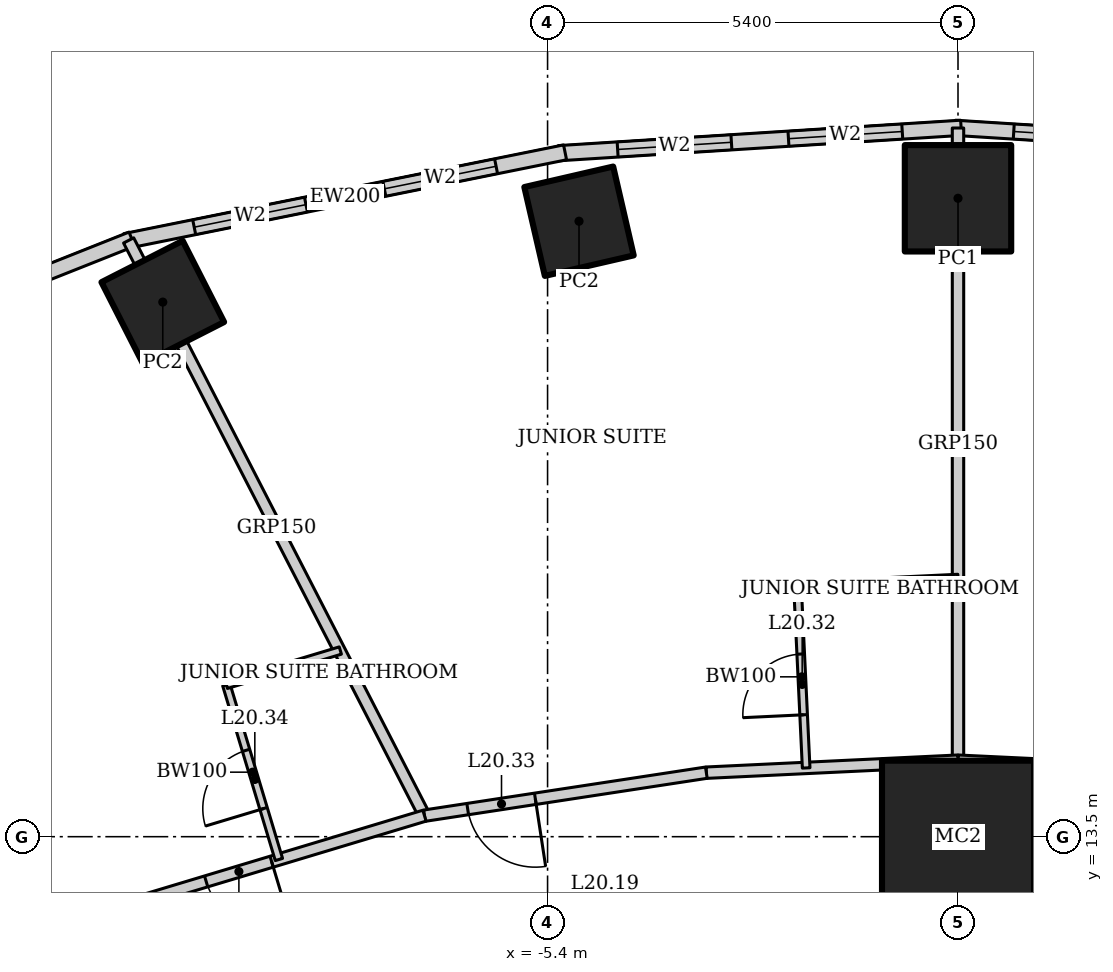
"""IFC4 building model, lengths in metres.
Left out: names, types, materials, properties, quantities, classifications, styles, units other than length and angle.
Written with IfcOpenShell. Run it as: python <this file> out.ifc"""

import sys

from ifc_helpers import new_model, si_unit, direction, frame, frame_2d, origin, origin_2d, place, context, subcontext, project, spatial, rectangle, hollow_rectangle, extrude, element, fill, save


model = new_model("IFC4")
c1 = context("Model", 3, precision=1e-05, world=origin(), true_north=direction((0.0, 1.0)))
c2 = subcontext(c1, "Body", "Model", "MODEL_VIEW")
j1 = project(units=[si_unit("LENGTHUNIT", "METRE"), si_unit("PLANEANGLEUNIT", "RADIAN")], contexts=[c1])
p1 = place(None, origin())
s1 = spatial("IfcSite", under=j1, at=p1, CompositionType="ELEMENT")
p2 = place(p1, origin())
s2 = spatial("IfcBuilding", under=s1, at=p2, CompositionType="ELEMENT")
p3 = place(p2, frame((0.0, 0.0, 87.4)))
s3 = spatial("IfcBuildingStorey", under=s2, at=p3, CompositionType="ELEMENT", Elevation=87.4)
p4 = place(p3, frame((0.0, 13.5, 0.0), z_axis=(0.0, 0.0, 1.0), x_axis=(1.0, 0.0, 0.0)))
e1 = element("IfcColumn", 1, at=p4, inside=s3, PredefinedType="COLUMN", context=c2, shape_type="SweptSolid", body=[
    extrude(hollow_rectangle(XDim=2.0, YDim=2.0, WallThickness=0.17, at=origin_2d()), origin(), (0.0, 0.0, 1.0), 3.6),
])
p5 = place(p3, frame((0.0, 21.9, 0.0), z_axis=(0.0, 0.0, 1.0), x_axis=(1.0, 0.0, 0.0)))
e2 = element("IfcColumn", 2, at=p5, inside=s3, PredefinedType="COLUMN", context=c2, shape_type="SweptSolid", body=[
    extrude(hollow_rectangle(XDim=1.4, YDim=1.4, WallThickness=0.1, at=origin_2d()), origin(), (0.0, 0.0, 1.0), 3.6),
])
for number, where, z_axis, x_axis in (
    (3, (-4.986, 21.598, 0.0), (0.0, 0.0, 1.0), (0.974, 0.225, 0.0)),
    (4, (-10.463, 20.534, 0.0), (0.0, 0.0, 1.0), (0.891, 0.454, 0.0)),
):
    element("IfcColumn", number, at=place(p3, frame(where, z_axis=z_axis, x_axis=x_axis)), inside=s3, PredefinedType="COLUMN", context=c2, shape_type="SweptSolid", body=[
        extrude(hollow_rectangle(XDim=1.2, YDim=1.2, WallThickness=0.1, at=origin_2d()), origin(), (0.0, 0.0, 1.0), 3.6),
    ])
p6 = place(p3, frame((5.253, 22.493, 0.0), z_axis=(0.0, 0.0, 1.0), x_axis=(-0.998018582375, 0.062919863585, 0.0)))
e5 = element("IfcWall", 5, at=p6, inside=s3, PredefinedType="SOLIDWALL", context=c2, shape_type="SweptSolid", body=[
    extrude(rectangle(XDim=5.304, YDim=0.2, at=frame_2d((2.652, 0.0))), origin(), (0.0, 0.0, 1.0), 3.45),
])
p7 = place(p6, frame((0.776, 0.0, 0.5)))
e6 = element("IfcOpeningElement", 6, at=p7, cuts=e5, PredefinedType="OPENING", context=c2, shape_type="SweptSolid", body=[
    extrude(rectangle(XDim=1.5, YDim=2.2, at=frame_2d((0.75, 1.1))), frame((0.0, 0.11, 0.0), z_axis=(0.0, -1.0, 0.0), x_axis=(1.0, 0.0, 0.0)), (0.0, 0.0, 1.0), 0.22),
])
p8 = place(p6, frame((3.028, 0.0, 0.5)))
e7 = element("IfcOpeningElement", 7, at=p8, cuts=e5, PredefinedType="OPENING", context=c2, shape_type="SweptSolid", body=[
    extrude(rectangle(XDim=1.5, YDim=2.2, at=frame_2d((0.75, 1.1))), frame((0.0, 0.11, 0.0), z_axis=(0.0, -1.0, 0.0), x_axis=(1.0, 0.0, 0.0)), (0.0, 0.0, 1.0), 0.22),
])
p9 = place(p3, frame((0.041, 22.827, 0.0), z_axis=(0.0, 0.0, 1.0), x_axis=(-0.998018582375, -0.062919863585, 0.0)))
e8 = element("IfcWall", 8, at=p9, inside=s3, PredefinedType="SOLIDWALL", context=c2, shape_type="SweptSolid", body=[
    extrude(rectangle(XDim=5.304, YDim=0.2, at=frame_2d((2.652, 0.0))), origin(), (0.0, 0.0, 1.0), 3.45),
])
p10 = place(p9, frame((0.776, 0.0, 0.5)))
e9 = element("IfcOpeningElement", 9, at=p10, cuts=e8, PredefinedType="OPENING", context=c2, shape_type="SweptSolid", body=[
    extrude(rectangle(XDim=1.5, YDim=2.2, at=frame_2d((0.75, 1.1))), frame((0.0, 0.11, 0.0), z_axis=(0.0, -1.0, 0.0), x_axis=(1.0, 0.0, 0.0)), (0.0, 0.0, 1.0), 0.22),
])
p11 = place(p9, frame((3.028, 0.0, 0.5)))
e10 = element("IfcOpeningElement", 10, at=p11, cuts=e8, PredefinedType="OPENING", context=c2, shape_type="SweptSolid", body=[
    extrude(rectangle(XDim=1.5, YDim=2.2, at=frame_2d((0.75, 1.1))), frame((0.0, 0.11, 0.0), z_axis=(0.0, -1.0, 0.0), x_axis=(1.0, 0.0, 0.0)), (0.0, 0.0, 1.0), 0.22),
])
p12 = place(p3, frame((-5.17, 22.504, 0.0), z_axis=(0.0, 0.0, 1.0), x_axis=(-0.980251657452, -0.197754110105, 0.0)))
e11 = element("IfcWall", 11, at=p12, inside=s3, PredefinedType="SOLIDWALL", context=c2, shape_type="SweptSolid", body=[
    extrude(rectangle(XDim=5.904, YDim=0.2, at=frame_2d((2.952, 0.0))), origin(), (0.0, 0.0, 1.0), 3.45),
])
p13 = place(p12, frame((0.926, 0.0, 0.5)))
e12 = element("IfcOpeningElement", 12, at=p13, cuts=e11, PredefinedType="OPENING", context=c2, shape_type="SweptSolid", body=[
    extrude(rectangle(XDim=1.5, YDim=2.2, at=frame_2d((0.75, 1.1))), frame((0.0, 0.11, 0.0), z_axis=(0.0, -1.0, 0.0), x_axis=(1.0, 0.0, 0.0)), (0.0, 0.0, 1.0), 0.22),
])
p14 = place(p12, frame((3.478, 0.0, 0.5)))
e13 = element("IfcOpeningElement", 13, at=p14, cuts=e11, PredefinedType="OPENING", context=c2, shape_type="SweptSolid", body=[
    extrude(rectangle(XDim=1.5, YDim=2.2, at=frame_2d((0.75, 1.1))), frame((0.0, 0.11, 0.0), z_axis=(0.0, -1.0, 0.0), x_axis=(1.0, 0.0, 0.0)), (0.0, 0.0, 1.0), 0.22),
])
p15 = place(p3, frame((-10.869, 21.363, 0.0), z_axis=(0.0, 0.0, 1.0), x_axis=(-0.929358351251, -0.369178892895, 0.0)))
e14 = element("IfcWall", 14, at=p15, inside=s3, PredefinedType="SOLIDWALL", context=c2, shape_type="SweptSolid", body=[
    extrude(rectangle(XDim=7.692, YDim=0.2, at=frame_2d((3.846, 0.0))), origin(), (0.0, 0.0, 1.0), 3.45),
])
p16 = place(p15, frame((1.373, 0.0, 0.5)))
e15 = element("IfcOpeningElement", 15, at=p16, cuts=e14, PredefinedType="OPENING", context=c2, shape_type="SweptSolid", body=[
    extrude(rectangle(XDim=1.5, YDim=2.2, at=frame_2d((0.75, 1.1))), frame((0.0, 0.11, 0.0), z_axis=(0.0, -1.0, 0.0), x_axis=(1.0, 0.0, 0.0)), (0.0, 0.0, 1.0), 0.22),
])
p17 = place(p15, frame((4.819, 0.0, 0.5)))
e16 = element("IfcOpeningElement", 16, at=p17, cuts=e14, PredefinedType="OPENING", context=c2, shape_type="SweptSolid", body=[
    extrude(rectangle(XDim=1.5, YDim=2.2, at=frame_2d((0.75, 1.1))), frame((0.0, 0.11, 0.0), z_axis=(0.0, -1.0, 0.0), x_axis=(1.0, 0.0, 0.0)), (0.0, 0.0, 1.0), 0.22),
])
p18 = place(p3, frame((0.0, 22.825, 0.0), z_axis=(0.0, 0.0, 1.0), x_axis=(0.0, -1.0, 0.0)))
e17 = element("IfcWall", 17, at=p18, inside=s3, PredefinedType="PARTITIONING", context=c2, shape_type="SweptSolid", body=[
    extrude(rectangle(XDim=8.325, YDim=0.15, at=frame_2d((4.162, 0.0))), origin(), (0.0, 0.0, 1.0), 2.924),
])
p19 = place(p3, frame((-10.912, 21.346, 0.0), z_axis=(0.0, 0.0, 1.0), x_axis=(0.457327273085, -0.889298468059, 0.0)))
e18 = element("IfcWall", 18, at=p19, inside=s3, PredefinedType="PARTITIONING", context=c2, shape_type="SweptSolid", body=[
    extrude(rectangle(XDim=8.511, YDim=0.15, at=frame_2d((4.256, 0.0))), origin(), (0.0, 0.0, 1.0), 2.528),
])
p20 = place(p3, frame((3.311, 14.342, 0.0), z_axis=(0.0, 0.0, 1.0), x_axis=(-0.998863968075, 0.047652631422, 0.0)))
e19 = element("IfcWall", 19, at=p20, inside=s3, PredefinedType="PARTITIONING", context=c2, shape_type="SweptSolid", body=[
    extrude(rectangle(XDim=3.315, YDim=0.15, at=frame_2d((1.657, 0.0))), origin(), (0.0, 0.0, 1.0), 3.45),
])
p21 = place(p20, frame((0.15, 0.0, 0.0)))
e20 = element("IfcOpeningElement", 20, at=p21, cuts=e19, PredefinedType="OPENING", context=c2, shape_type="SweptSolid", body=[
    extrude(rectangle(XDim=0.9, YDim=2.1, at=frame_2d((0.45, 1.05))), frame((0.0, 0.085, 0.0), z_axis=(0.0, -1.0, 0.0), x_axis=(1.0, 0.0, 0.0)), (0.0, 0.0, 1.0), 0.17),
])
p22 = place(p3, frame((0.0, 14.5, 0.0), z_axis=(0.0, 0.0, 1.0), x_axis=(-0.998863968075, -0.047652631422, 0.0)))
e21 = element("IfcWall", 21, at=p22, inside=s3, PredefinedType="PARTITIONING", context=c2, shape_type="SweptSolid", body=[
    extrude(rectangle(XDim=3.315, YDim=0.15, at=frame_2d((1.657, 0.0))), origin(), (0.0, 0.0, 1.0), 3.45),
])
p23 = place(p3, frame((-3.311, 14.342, 0.0), z_axis=(0.0, 0.0, 1.0), x_axis=(-0.988564270062, -0.150800145746, 0.0)))
e22 = element("IfcWall", 22, at=p23, inside=s3, PredefinedType="PARTITIONING", context=c2, shape_type="SweptSolid", body=[
    extrude(rectangle(XDim=3.751, YDim=0.15, at=frame_2d((1.875, 0.0))), origin(), (0.0, 0.0, 1.0), 3.45),
])
p24 = place(p23, frame((2.276, 0.0, 0.0)))
e23 = element("IfcOpeningElement", 23, at=p24, cuts=e22, PredefinedType="OPENING", context=c2, shape_type="SweptSolid", body=[
    extrude(rectangle(XDim=0.9, YDim=2.1, at=frame_2d((0.45, 1.05))), frame((0.0, 0.085, 0.0), z_axis=(0.0, -1.0, 0.0), x_axis=(1.0, 0.0, 0.0)), (0.0, 0.0, 1.0), 0.17),
])
p25 = place(p3, frame((-7.019, 13.776, 0.0), z_axis=(0.0, 0.0, 1.0), x_axis=(-0.957564241242, -0.288219922793, 0.0)))
e24 = element("IfcWall", 24, at=p25, inside=s3, PredefinedType="PARTITIONING", context=c2, shape_type="SweptSolid", body=[
    extrude(rectangle(XDim=5.085, YDim=0.15, at=frame_2d((2.542, 0.0))), origin(), (0.0, 0.0, 1.0), 3.45),
])
p26 = place(p25, frame((2.1, 0.0, 0.0)))
e25 = element("IfcOpeningElement", 25, at=p26, cuts=e24, PredefinedType="OPENING", context=c2, shape_type="SweptSolid", body=[
    extrude(rectangle(XDim=0.9, YDim=2.1, at=frame_2d((0.45, 1.05))), frame((0.0, 0.085, 0.0), z_axis=(0.0, -1.0, 0.0), x_axis=(1.0, 0.0, 0.0)), (0.0, 0.0, 1.0), 0.17),
])
p27 = place(p3, frame((-1.998, 14.405, 0.0), z_axis=(0.0, 0.0, 1.0), x_axis=(-0.047608648396, 0.998866065395, 0.0)))
e26 = element("IfcWall", 26, at=p27, inside=s3, PredefinedType="PARTITIONING", context=c2, shape_type="SweptSolid", body=[
    extrude(rectangle(XDim=2.4, YDim=0.1, at=frame_2d((1.2, 0.0))), origin(), (0.0, 0.0, 1.0), 2.749),
])
p28 = place(p27, frame((0.7, 0.0, 0.0)))
e27 = element("IfcOpeningElement", 27, at=p28, cuts=e26, PredefinedType="OPENING", context=c2, shape_type="SweptSolid", body=[
    extrude(rectangle(XDim=0.8, YDim=2.1, at=frame_2d((0.4, 1.05))), frame((0.0, 0.06, 0.0), z_axis=(0.0, -1.0, 0.0), x_axis=(1.0, 0.0, 0.0)), (0.0, 0.0, 1.0), 0.12),
])
p29 = place(p3, frame((-2.112, 16.802, 0.0), z_axis=(0.0, 0.0, 1.0), x_axis=(0.998862383453, 0.047685835668, 0.0)))
e28 = element("IfcWall", 28, at=p29, inside=s3, PredefinedType="PARTITIONING", context=c2, shape_type="SweptSolid", body=[
    extrude(rectangle(XDim=2.115, YDim=0.1, at=frame_2d((1.057, 0.0))), origin(), (0.0, 0.0, 1.0), 3.45),
])
p30 = place(p3, frame((-8.935, 13.2, 0.0), z_axis=(0.0, 0.0, 1.0), x_axis=(-0.288197066254, 0.957571120598, 0.0)))
e29 = element("IfcWall", 29, at=p30, inside=s3, PredefinedType="PARTITIONING", context=c2, shape_type="SweptSolid", body=[
    extrude(rectangle(XDim=2.4, YDim=0.1, at=frame_2d((1.2, 0.0))), origin(), (0.0, 0.0, 1.0), 3.45),
])
p31 = place(p30, frame((0.7, 0.0, 0.0)))
e30 = element("IfcOpeningElement", 30, at=p31, cuts=e29, PredefinedType="OPENING", context=c2, shape_type="SweptSolid", body=[
    extrude(rectangle(XDim=0.8, YDim=2.1, at=frame_2d((0.4, 1.05))), frame((0.0, 0.06, 0.0), z_axis=(0.0, -1.0, 0.0), x_axis=(1.0, 0.0, 0.0)), (0.0, 0.0, 1.0), 0.12),
])
p32 = place(p3, frame((-9.626, 15.498, 0.0), z_axis=(0.0, 0.0, 1.0), x_axis=(0.957551231109, 0.288263143328, 0.0)))
e31 = element("IfcWall", 31, at=p32, inside=s3, PredefinedType="PARTITIONING", context=c2, shape_type="SweptSolid", body=[
    extrude(rectangle(XDim=1.566, YDim=0.1, at=frame_2d((0.783, 0.0))), origin(), (0.0, 0.0, 1.0), 3.45),
])
p33 = place(p8, origin())
e32 = element("IfcWindow", 32, at=p33, inside=s3, PartitioningType="SINGLE_PANEL", PredefinedType="WINDOW", context=c2, shape_type="SweptSolid", body=[
    extrude(rectangle(XDim=1.5, YDim=2.2, at=frame_2d((0.75, 1.1))), frame((0.0, 0.03, 0.0), z_axis=(0.0, -1.0, 0.0), x_axis=(1.0, 0.0, 0.0)), (0.0, 0.0, 1.0), 0.06),
])
fill(e7, e32)
p34 = place(p10, origin())
e33 = element("IfcWindow", 33, at=p34, inside=s3, PartitioningType="SINGLE_PANEL", PredefinedType="WINDOW", context=c2, shape_type="SweptSolid", body=[
    extrude(rectangle(XDim=1.5, YDim=2.2, at=frame_2d((0.75, 1.1))), frame((0.0, 0.03, 0.0), z_axis=(0.0, -1.0, 0.0), x_axis=(1.0, 0.0, 0.0)), (0.0, 0.0, 1.0), 0.06),
])
fill(e9, e33)
p35 = place(p11, origin())
e34 = element("IfcWindow", 34, at=p35, inside=s3, PartitioningType="SINGLE_PANEL", PredefinedType="WINDOW", context=c2, shape_type="SweptSolid", body=[
    extrude(rectangle(XDim=1.5, YDim=2.2, at=frame_2d((0.75, 1.1))), frame((0.0, 0.03, 0.0), z_axis=(0.0, -1.0, 0.0), x_axis=(1.0, 0.0, 0.0)), (0.0, 0.0, 1.0), 0.06),
])
fill(e10, e34)
p36 = place(p13, origin())
e35 = element("IfcWindow", 35, at=p36, inside=s3, PartitioningType="SINGLE_PANEL", PredefinedType="WINDOW", context=c2, shape_type="SweptSolid", body=[
    extrude(rectangle(XDim=1.5, YDim=2.2, at=frame_2d((0.75, 1.1))), frame((0.0, 0.03, 0.0), z_axis=(0.0, -1.0, 0.0), x_axis=(1.0, 0.0, 0.0)), (0.0, 0.0, 1.0), 0.06),
])
fill(e12, e35)
p37 = place(p14, origin())
e36 = element("IfcWindow", 36, at=p37, inside=s3, PartitioningType="SINGLE_PANEL", PredefinedType="WINDOW", context=c2, shape_type="SweptSolid", body=[
    extrude(rectangle(XDim=1.5, YDim=2.2, at=frame_2d((0.75, 1.1))), frame((0.0, 0.03, 0.0), z_axis=(0.0, -1.0, 0.0), x_axis=(1.0, 0.0, 0.0)), (0.0, 0.0, 1.0), 0.06),
])
fill(e13, e36)
p38 = place(p28, origin())
e37 = element("IfcDoor", 37, at=p38, inside=s3, OperationType="SINGLE_SWING_LEFT", PredefinedType="DOOR", context=c2, shape_type="SweptSolid", body=[
    extrude(rectangle(XDim=0.8, YDim=2.1, at=frame_2d((0.4, 1.05))), frame((0.0, 0.025, 0.0), z_axis=(0.0, -1.0, 0.0), x_axis=(1.0, 0.0, 0.0)), (0.0, 0.0, 1.0), 0.05),
])
fill(e27, e37)
p39 = place(p24, origin())
e38 = element("IfcDoor", 38, at=p39, inside=s3, OperationType="SINGLE_SWING_LEFT", PredefinedType="DOOR", context=c2, shape_type="SweptSolid", body=[
    extrude(rectangle(XDim=0.9, YDim=2.1, at=frame_2d((0.45, 1.05))), frame((0.0, 0.025, 0.0), z_axis=(0.0, -1.0, 0.0), x_axis=(1.0, 0.0, 0.0)), (0.0, 0.0, 1.0), 0.05),
])
fill(e23, e38)
p40 = place(p31, origin())
e39 = element("IfcDoor", 39, at=p40, inside=s3, OperationType="SINGLE_SWING_LEFT", PredefinedType="DOOR", context=c2, shape_type="SweptSolid", body=[
    extrude(rectangle(XDim=0.8, YDim=2.1, at=frame_2d((0.4, 1.05))), frame((0.0, 0.025, 0.0), z_axis=(0.0, -1.0, 0.0), x_axis=(1.0, 0.0, 0.0)), (0.0, 0.0, 1.0), 0.05),
])
fill(e30, e39)
p41 = place(p26, origin())
e40 = element("IfcDoor", 40, at=p41, inside=s3, OperationType="SINGLE_SWING_LEFT", PredefinedType="DOOR", context=c2, shape_type="SweptSolid", body=[
    extrude(rectangle(XDim=0.9, YDim=2.1, at=frame_2d((0.45, 1.05))), frame((0.0, 0.025, 0.0), z_axis=(0.0, -1.0, 0.0), x_axis=(1.0, 0.0, 0.0)), (0.0, 0.0, 1.0), 0.05),
])
fill(e25, e40)
save(model, sys.argv[1])
